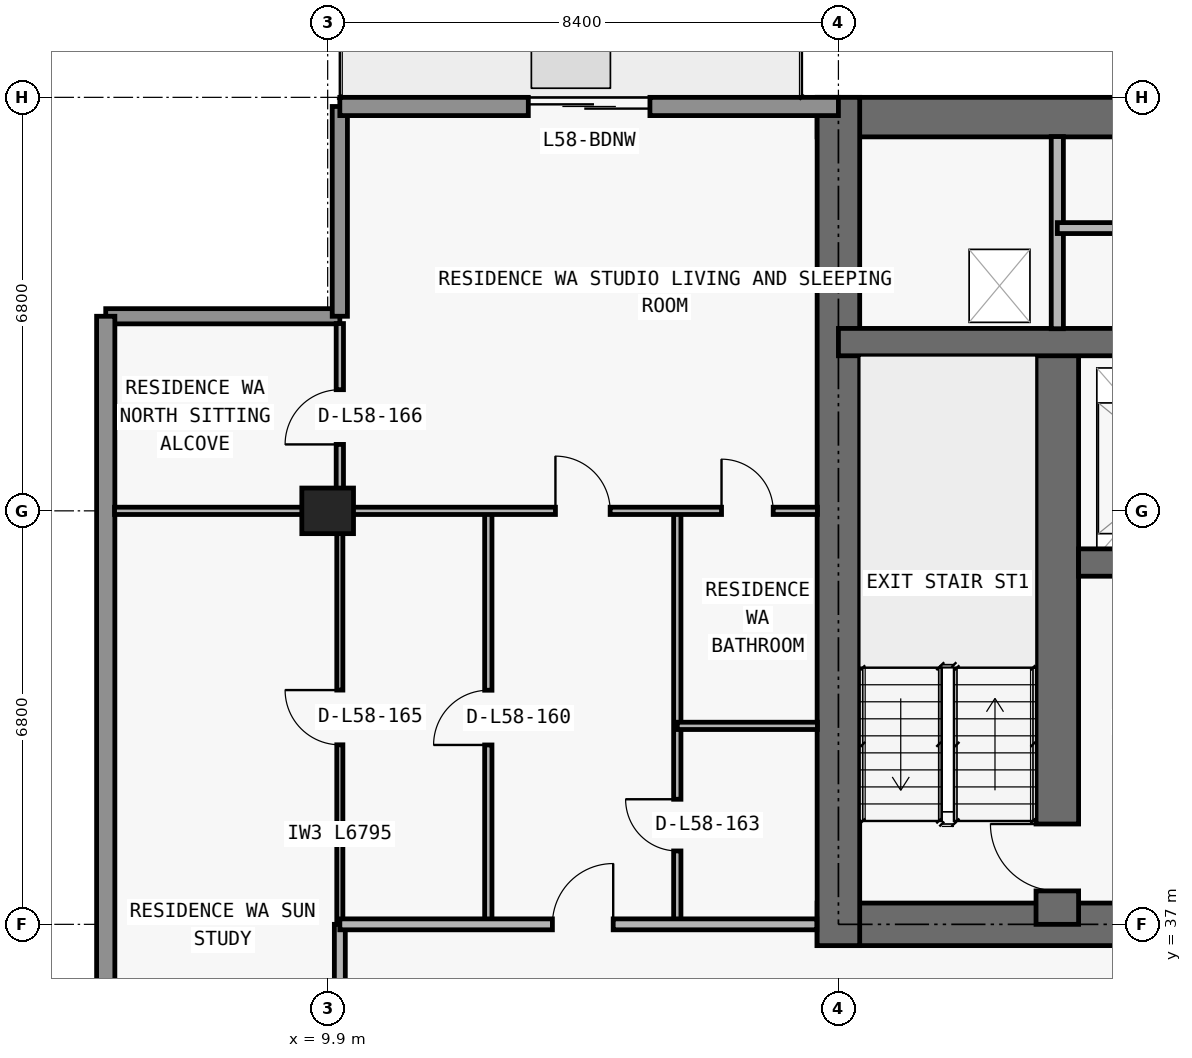
"""IFC4 building model, lengths in metres.
Left out: names, types, materials, properties, quantities, classifications, styles, units other than length and angle.
Written with IfcOpenShell. Run it as: python <this file> out.ifc"""

import sys

from ifc_helpers import new_model, si_unit, direction, frame, frame_2d, origin, origin_2d, place, context, subcontext, project, spatial, rectangle, extrude, element, fill, save


model = new_model("IFC4")
c1 = context("Model", 3, precision=1e-05, world=origin(), true_north=direction((0.0, 1.0)))
c2 = subcontext(c1, "Body", "Model", "MODEL_VIEW")
j1 = project(units=[si_unit("LENGTHUNIT", "METRE"), si_unit("PLANEANGLEUNIT", "RADIAN")], contexts=[c1])
p1 = place(None, origin())
s1 = spatial("IfcSite", under=j1, at=p1, CompositionType="ELEMENT")
p2 = place(p1, origin())
s2 = spatial("IfcBuilding", under=s1, at=p2, CompositionType="ELEMENT")
p3 = place(p2, frame((0.0, 0.0, 208.2)))
s3 = spatial("IfcBuildingStorey", under=s2, at=p3, CompositionType="ELEMENT", Elevation=208.2)
p4 = place(p3, frame((9.9, 43.8, 0.0), z_axis=(0.0, 0.0, 1.0), x_axis=(1.0, 0.0, 0.0)))
e1 = element("IfcColumn", 1, at=p4, inside=s3, PredefinedType="COLUMN", context=c2, shape_type="SweptSolid", body=[
    extrude(rectangle(XDim=0.85, YDim=0.75, at=origin_2d()), origin(), (0.0, 0.0, 1.0), 3.05),
])
p5 = place(p3, frame((17.95, 37.0, 0.0), z_axis=(0.0, 0.0, 1.0), x_axis=(1.0, 0.0, 0.0)))
e2 = element("IfcWall", 2, at=p5, inside=s3, PredefinedType="SHEAR", context=c2, shape_type="SweptSolid", body=[
    extrude(rectangle(XDim=41.9, YDim=0.7, at=frame_2d((20.95, 0.0))), origin(), (0.0, 0.0, 1.0), 3.05),
])
p6 = place(p5, frame((14.35, 0.0, 0.0)))
e3 = element("IfcOpeningElement", 3, at=p6, cuts=e2, PredefinedType="OPENING", context=c2, shape_type="SweptSolid", body=[
    extrude(rectangle(XDim=1.1, YDim=2.15, at=frame_2d((0.55, 1.075))), frame((0.0, 0.36, 0.0), z_axis=(0.0, -1.0, 0.0), x_axis=(1.0, 0.0, 0.0)), (0.0, 0.0, 1.0), 0.72),
])
p7 = place(p5, frame((6.2, 0.0, 0.0)))
e4 = element("IfcOpeningElement", 4, at=p7, cuts=e2, PredefinedType="OPENING", context=c2, shape_type="SweptSolid", body=[
    extrude(rectangle(XDim=1.05, YDim=2.15, at=frame_2d((0.525, 1.075))), frame((0.0, 0.36, 0.0), z_axis=(0.0, -1.0, 0.0), x_axis=(1.0, 0.0, 0.0)), (0.0, 0.0, 1.0), 0.72),
])
p8 = place(p5, frame((34.7, 0.0, 0.0)))
e5 = element("IfcOpeningElement", 5, at=p8, cuts=e2, PredefinedType="OPENING", context=c2, shape_type="SweptSolid", body=[
    extrude(rectangle(XDim=1.05, YDim=2.15, at=frame_2d((0.525, 1.075))), frame((0.0, 0.36, 0.0), z_axis=(0.0, -1.0, 0.0), x_axis=(1.0, 0.0, 0.0)), (0.0, 0.0, 1.0), 0.72),
])
p9 = place(p5, frame((10.812, 0.0, 0.0)))
e6 = element("IfcOpeningElement", 6, at=p9, cuts=e2, PredefinedType="OPENING", context=c2, shape_type="SweptSolid", body=[
    extrude(rectangle(XDim=1.05, YDim=2.15, at=frame_2d((0.525, 1.075))), frame((0.0, 0.36, 0.0), z_axis=(0.0, -1.0, 0.0), x_axis=(1.0, 0.0, 0.0)), (0.0, 0.0, 1.0), 0.72),
])
p10 = place(p5, frame((24.05, 0.0, 0.0)))
e7 = element("IfcOpeningElement", 7, at=p10, cuts=e2, PredefinedType="OPENING", context=c2, shape_type="SweptSolid", body=[
    extrude(rectangle(XDim=1.05, YDim=2.15, at=frame_2d((0.525, 1.075))), frame((0.0, 0.36, 0.0), z_axis=(0.0, -1.0, 0.0), x_axis=(1.0, 0.0, 0.0)), (0.0, 0.0, 1.0), 0.72),
])
p11 = place(p3, frame((17.95, 50.275, 0.0), z_axis=(0.0, 0.0, 1.0), x_axis=(1.0, 0.0, 0.0)))
e8 = element("IfcWall", 8, at=p11, inside=s3, PredefinedType="SHEAR", context=c2, shape_type="SweptSolid", body=[
    extrude(rectangle(XDim=41.9, YDim=0.65, at=frame_2d((20.95, 0.0))), origin(), (0.0, 0.0, 1.0), 3.05),
])
p12 = place(p3, frame((18.3, 36.65, 0.0), z_axis=(0.0, 0.0, 1.0), x_axis=(0.0, 1.0, 0.0)))
e9 = element("IfcWall", 9, at=p12, inside=s3, PredefinedType="SHEAR", context=c2, shape_type="SweptSolid", body=[
    extrude(rectangle(XDim=13.95, YDim=0.7, at=frame_2d((6.975, 0.0))), origin(), (0.0, 0.0, 1.0), 3.05),
])
p13 = place(p3, frame((21.9, 37.0, 0.0), z_axis=(0.0, 0.0, 1.0), x_axis=(0.0, 1.0, 0.0)))
e10 = element("IfcWall", 10, at=p13, inside=s3, PredefinedType="SHEAR", context=c2, shape_type="SweptSolid", body=[
    extrude(rectangle(XDim=9.575, YDim=0.7, at=frame_2d((4.788, 0.0))), origin(), (0.0, 0.0, 1.0), 3.05),
])
p14 = place(p13, frame((0.55, 0.0, 0.0)))
e11 = element("IfcOpeningElement", 11, at=p14, cuts=e10, PredefinedType="OPENING", context=c2, shape_type="SweptSolid", body=[
    extrude(rectangle(XDim=1.1, YDim=2.15, at=frame_2d((0.55, 1.075))), frame((0.0, 0.36, 0.0), z_axis=(0.0, -1.0, 0.0), x_axis=(1.0, 0.0, 0.0)), (0.0, 0.0, 1.0), 0.72),
])
p15 = place(p3, frame((22.25, 42.95, 0.0), z_axis=(0.0, 0.0, 1.0), x_axis=(1.0, 0.0, 0.0)))
e12 = element("IfcWall", 12, at=p15, inside=s3, PredefinedType="SHEAR", context=c2, shape_type="SweptSolid", body=[
    extrude(rectangle(XDim=33.3, YDim=0.45, at=frame_2d((16.65, 0.0))), origin(), (0.0, 0.0, 1.0), 3.05),
])
p16 = place(p15, frame((1.05, 0.0, 0.0)))
e13 = element("IfcOpeningElement", 13, at=p16, cuts=e12, PredefinedType="OPENING", context=c2, shape_type="SweptSolid", body=[
    extrude(rectangle(XDim=1.2, YDim=2.2, at=frame_2d((0.6, 1.1))), frame((0.0, 0.235, 0.0), z_axis=(0.0, -1.0, 0.0), x_axis=(1.0, 0.0, 0.0)), (0.0, 0.0, 1.0), 0.47),
])
p17 = place(p15, frame((31.05, 0.0, 0.0)))
e14 = element("IfcOpeningElement", 14, at=p17, cuts=e12, PredefinedType="OPENING", context=c2, shape_type="SweptSolid", body=[
    extrude(rectangle(XDim=1.2, YDim=2.2, at=frame_2d((0.6, 1.1))), frame((0.0, 0.235, 0.0), z_axis=(0.0, -1.0, 0.0), x_axis=(1.0, 0.0, 0.0)), (0.0, 0.0, 1.0), 0.47),
])
p18 = place(p15, frame((26.45, 0.0, 0.0)))
e15 = element("IfcOpeningElement", 15, at=p18, cuts=e12, PredefinedType="OPENING", context=c2, shape_type="SweptSolid", body=[
    extrude(rectangle(XDim=1.1, YDim=2.2, at=frame_2d((0.55, 1.1))), frame((0.0, 0.235, 0.0), z_axis=(0.0, -1.0, 0.0), x_axis=(1.0, 0.0, 0.0)), (0.0, 0.0, 1.0), 0.47),
])
p19 = place(p15, frame((5.95, 0.0, 0.0)))
e16 = element("IfcOpeningElement", 16, at=p19, cuts=e12, PredefinedType="OPENING", context=c2, shape_type="SweptSolid", body=[
    extrude(rectangle(XDim=1.1, YDim=2.2, at=frame_2d((0.55, 1.1))), frame((0.0, 0.235, 0.0), z_axis=(0.0, -1.0, 0.0), x_axis=(1.0, 0.0, 0.0)), (0.0, 0.0, 1.0), 0.47),
])
p20 = place(p15, frame((3.625, 0.0, 0.0)))
e17 = element("IfcOpeningElement", 17, at=p20, cuts=e12, PredefinedType="OPENING", context=c2, shape_type="SweptSolid", body=[
    extrude(rectangle(XDim=1.05, YDim=2.15, at=frame_2d((0.525, 1.075))), frame((0.0, 0.235, 0.0), z_axis=(0.0, -1.0, 0.0), x_axis=(1.0, 0.0, 0.0)), (0.0, 0.0, 1.0), 0.47),
])
p21 = place(p15, frame((28.675, 0.0, 0.0)))
e18 = element("IfcOpeningElement", 18, at=p21, cuts=e12, PredefinedType="OPENING", context=c2, shape_type="SweptSolid", body=[
    extrude(rectangle(XDim=1.05, YDim=2.15, at=frame_2d((0.525, 1.075))), frame((0.0, 0.235, 0.0), z_axis=(0.0, -1.0, 0.0), x_axis=(1.0, 0.0, 0.0)), (0.0, 0.0, 1.0), 0.47),
])
p22 = place(p15, frame((15.225, 0.0, 0.0)))
e19 = element("IfcOpeningElement", 19, at=p22, cuts=e12, PredefinedType="OPENING", context=c2, shape_type="SweptSolid", body=[
    extrude(rectangle(XDim=1.0, YDim=2.2, at=frame_2d((0.5, 1.1))), frame((0.0, 0.235, 0.0), z_axis=(0.0, -1.0, 0.0), x_axis=(1.0, 0.0, 0.0)), (0.0, 0.0, 1.0), 0.47),
])
p23 = place(p15, frame((21.975, 0.0, 0.0)))
e20 = element("IfcOpeningElement", 20, at=p23, cuts=e12, PredefinedType="OPENING", context=c2, shape_type="SweptSolid", body=[
    extrude(rectangle(XDim=1.0, YDim=2.2, at=frame_2d((0.5, 1.1))), frame((0.0, 0.235, 0.0), z_axis=(0.0, -1.0, 0.0), x_axis=(1.0, 0.0, 0.0)), (0.0, 0.0, 1.0), 0.47),
])
p24 = place(p3, frame((18.3, 46.575, 0.0), z_axis=(0.0, 0.0, 1.0), x_axis=(1.0, 0.0, 0.0)))
e21 = element("IfcWall", 21, at=p24, inside=s3, PredefinedType="SHEAR", context=c2, shape_type="SweptSolid", body=[
    extrude(rectangle(XDim=41.2, YDim=0.45, at=frame_2d((20.6, 0.0))), origin(), (0.0, 0.0, 1.0), 3.05),
])
p25 = place(p24, frame((7.575, 0.0, 0.0)))
e22 = element("IfcOpeningElement", 22, at=p25, cuts=e21, PredefinedType="OPENING", context=c2, shape_type="SweptSolid", body=[
    extrude(rectangle(XDim=1.05, YDim=2.15, at=frame_2d((0.525, 1.075))), frame((0.0, 0.235, 0.0), z_axis=(0.0, -1.0, 0.0), x_axis=(1.0, 0.0, 0.0)), (0.0, 0.0, 1.0), 0.47),
])
p26 = place(p24, frame((32.625, 0.0, 0.0)))
e23 = element("IfcOpeningElement", 23, at=p26, cuts=e21, PredefinedType="OPENING", context=c2, shape_type="SweptSolid", body=[
    extrude(rectangle(XDim=1.05, YDim=2.15, at=frame_2d((0.525, 1.075))), frame((0.0, 0.235, 0.0), z_axis=(0.0, -1.0, 0.0), x_axis=(1.0, 0.0, 0.0)), (0.0, 0.0, 1.0), 0.47),
])
p27 = place(p3, frame((6.25, 47.0, 0.0), z_axis=(0.0, 0.0, 1.0), x_axis=(1.0, 0.0, 0.0)))
e24 = element("IfcWall", 24, at=p27, inside=s3, PredefinedType="ELEMENTEDWALL", context=c2, shape_type="SweptSolid", body=[
    extrude(rectangle(XDim=3.85, YDim=0.25, at=frame_2d((1.925, 0.0))), origin(), (0.0, 0.0, 1.0), 3.05),
])
p28 = place(p3, frame((10.1, 47.0, 0.0), z_axis=(0.0, 0.0, 1.0), x_axis=(0.0, 1.0, 0.0)))
e25 = element("IfcWall", 25, at=p28, inside=s3, PredefinedType="ELEMENTEDWALL", context=c2, shape_type="SweptSolid", body=[
    extrude(rectangle(XDim=3.45, YDim=0.25, at=frame_2d((1.725, 0.0))), origin(), (0.0, 0.0, 1.0), 3.05),
])
p29 = place(p3, frame((6.25, 29.1, 0.0), z_axis=(0.0, 0.0, 1.0), x_axis=(0.0, 1.0, 0.0)))
e26 = element("IfcWall", 26, at=p29, inside=s3, PredefinedType="STANDARD", context=c2, shape_type="SweptSolid", body=[
    extrude(rectangle(XDim=17.9, YDim=0.3, at=frame_2d((8.95, 0.0))), origin(), (0.0, 0.0, 1.0), 3.05),
])
p30 = place(p3, frame((10.1, 50.45, 0.0), z_axis=(0.0, 0.0, 1.0), x_axis=(1.0, 0.0, 0.0)))
e27 = element("IfcWall", 27, at=p30, inside=s3, PredefinedType="STANDARD", context=c2, shape_type="SweptSolid", body=[
    extrude(rectangle(XDim=8.2, YDim=0.3, at=frame_2d((4.1, 0.0))), origin(), (0.0, 0.0, 1.0), 3.05),
])
p31 = place(p30, frame((3.1, 0.0, 0.0)))
e28 = element("IfcOpeningElement", 28, at=p31, cuts=e27, PredefinedType="OPENING", context=c2, shape_type="SweptSolid", body=[
    extrude(rectangle(XDim=2.0, YDim=2.3, at=frame_2d((1.0, 1.15))), frame((0.0, 0.16, 0.0), z_axis=(0.0, -1.0, 0.0), x_axis=(1.0, 0.0, 0.0)), (0.0, 0.0, 1.0), 0.32),
])
p32 = place(p3, frame((10.1, 34.005, 0.0), z_axis=(0.0, 0.0, 1.0), x_axis=(0.0, 1.0, 0.0)))
e29 = element("IfcWall", 29, at=p32, inside=s3, PredefinedType="PARTITIONING", context=c2, shape_type="SweptSolid", body=[
    extrude(rectangle(XDim=2.995, YDim=0.18, at=frame_2d((1.498, 0.0))), origin(), (0.0, 0.0, 1.0), 2.263),
])
p33 = place(p3, frame((10.1, 37.005, 0.0), z_axis=(0.0, 0.0, 1.0), x_axis=(0.0, 1.0, 0.0)))
e30 = element("IfcWall", 30, at=p33, inside=s3, PredefinedType="MOVABLE", context=c2, shape_type="SweptSolid", body=[
    extrude(rectangle(XDim=6.795, YDim=0.1, at=frame_2d((3.397, 0.0))), origin(), (0.0, 0.0, 1.0), 2.263),
])
p34 = place(p33, frame((2.948, 0.0, 0.0)))
e31 = element("IfcOpeningElement", 31, at=p34, cuts=e30, PredefinedType="OPENING", context=c2, shape_type="SweptSolid", body=[
    extrude(rectangle(XDim=0.9, YDim=2.15, at=frame_2d((0.45, 1.075))), frame((0.0, 0.06, 0.0), z_axis=(0.0, -1.0, 0.0), x_axis=(1.0, 0.0, 0.0)), (0.0, 0.0, 1.0), 0.12),
])
p35 = place(p3, frame((10.1, 43.805, 0.0), z_axis=(0.0, 0.0, 1.0), x_axis=(0.0, 1.0, 0.0)))
e32 = element("IfcWall", 32, at=p35, inside=s3, PredefinedType="PARTITIONING", context=c2, shape_type="SweptSolid", body=[
    extrude(rectangle(XDim=3.075, YDim=0.12, at=frame_2d((1.538, 0.0))), origin(), (0.0, 0.0, 1.0), 3.05),
])
p36 = place(p35, frame((1.087, 0.0, 0.0)))
e33 = element("IfcOpeningElement", 33, at=p36, cuts=e32, PredefinedType="OPENING", context=c2, shape_type="SweptSolid", body=[
    extrude(rectangle(XDim=0.9, YDim=2.15, at=frame_2d((0.45, 1.075))), frame((0.0, 0.07, 0.0), z_axis=(0.0, -1.0, 0.0), x_axis=(1.0, 0.0, 0.0)), (0.0, 0.0, 1.0), 0.14),
])
p37 = place(p3, frame((12.542, 37.0, 0.0), z_axis=(0.0, 0.0, 1.0), x_axis=(0.0, 1.0, 0.0)))
e34 = element("IfcWall", 34, at=p37, inside=s3, PredefinedType="PARTITIONING", context=c2, shape_type="SweptSolid", body=[
    extrude(rectangle(XDim=6.8, YDim=0.12, at=frame_2d((3.4, 0.0))), origin(), (0.0, 0.0, 1.0), 3.05),
])
p38 = place(p37, frame((2.95, 0.0, 0.0)))
e35 = element("IfcOpeningElement", 35, at=p38, cuts=e34, PredefinedType="OPENING", context=c2, shape_type="SweptSolid", body=[
    extrude(rectangle(XDim=0.9, YDim=2.15, at=frame_2d((0.45, 1.075))), frame((0.0, 0.07, 0.0), z_axis=(0.0, -1.0, 0.0), x_axis=(1.0, 0.0, 0.0)), (0.0, 0.0, 1.0), 0.14),
])
p39 = place(p3, frame((15.65, 37.0, 0.0), z_axis=(0.0, 0.0, 1.0), x_axis=(0.0, 1.0, 0.0)))
e36 = element("IfcWall", 36, at=p39, inside=s3, PredefinedType="PARTITIONING", context=c2, shape_type="SweptSolid", body=[
    extrude(rectangle(XDim=6.8, YDim=0.12, at=frame_2d((3.4, 0.0))), origin(), (0.0, 0.0, 1.0), 3.05),
])
p40 = place(p39, frame((1.207, 0.0, 0.0)))
e37 = element("IfcOpeningElement", 37, at=p40, cuts=e36, PredefinedType="OPENING", context=c2, shape_type="SweptSolid", body=[
    extrude(rectangle(XDim=0.85, YDim=2.1, at=frame_2d((0.425, 1.05))), frame((0.0, 0.07, 0.0), z_axis=(0.0, -1.0, 0.0), x_axis=(1.0, 0.0, 0.0)), (0.0, 0.0, 1.0), 0.14),
])
p41 = place(p3, frame((21.9, 46.795, 0.0), z_axis=(0.0, 0.0, 1.0), x_axis=(0.0, 1.0, 0.0)))
e38 = element("IfcWall", 38, at=p41, inside=s3, PredefinedType="PARTITIONING", context=c2, shape_type="SweptSolid", body=[
    extrude(rectangle(XDim=3.16, YDim=0.2, at=frame_2d((1.58, 0.0))), origin(), (0.0, 0.0, 1.0), 3.05),
])
p42 = place(p3, frame((10.1, 37.0, 0.0), z_axis=(0.0, 0.0, 1.0), x_axis=(1.0, 0.0, 0.0)))
e39 = element("IfcWall", 39, at=p42, inside=s3, PredefinedType="PARTITIONING", context=c2, shape_type="SweptSolid", body=[
    extrude(rectangle(XDim=7.845, YDim=0.18, at=frame_2d((3.922, 0.0))), origin(), (0.0, 0.0, 1.0), 3.05),
])
p43 = place(p42, frame((3.496, 0.0, 0.0)))
e40 = element("IfcOpeningElement", 40, at=p43, cuts=e39, PredefinedType="OPENING", context=c2, shape_type="SweptSolid", body=[
    extrude(rectangle(XDim=1.0, YDim=2.2, at=frame_2d((0.5, 1.1))), frame((0.0, 0.1, 0.0), z_axis=(0.0, -1.0, 0.0), x_axis=(1.0, 0.0, 0.0)), (0.0, 0.0, 1.0), 0.2),
])
p44 = place(p3, frame((15.65, 40.264, 0.0), z_axis=(0.0, 0.0, 1.0), x_axis=(1.0, 0.0, 0.0)))
e41 = element("IfcWall", 41, at=p44, inside=s3, PredefinedType="PARTITIONING", context=c2, shape_type="SweptSolid", body=[
    extrude(rectangle(XDim=2.305, YDim=0.12, at=frame_2d((1.153, 0.0))), origin(), (0.0, 0.0, 1.0), 3.05),
])
p45 = place(p3, frame((6.395, 43.8, 0.0), z_axis=(0.0, 0.0, 1.0), x_axis=(1.0, 0.0, 0.0)))
e42 = element("IfcWall", 42, at=p45, inside=s3, PredefinedType="PARTITIONING", context=c2, shape_type="SweptSolid", body=[
    extrude(rectangle(XDim=11.56, YDim=0.12, at=frame_2d((5.78, 0.0))), origin(), (0.0, 0.0, 1.0), 2.418),
])
p46 = place(p45, frame((7.251, 0.0, 0.0)))
e43 = element("IfcOpeningElement", 43, at=p46, cuts=e42, PredefinedType="OPENING", context=c2, shape_type="SweptSolid", body=[
    extrude(rectangle(XDim=0.9, YDim=2.15, at=frame_2d((0.45, 1.075))), frame((0.0, 0.07, 0.0), z_axis=(0.0, -1.0, 0.0), x_axis=(1.0, 0.0, 0.0)), (0.0, 0.0, 1.0), 0.14),
])
p47 = place(p45, frame((9.982, 0.0, 0.0)))
e44 = element("IfcOpeningElement", 44, at=p47, cuts=e42, PredefinedType="OPENING", context=c2, shape_type="SweptSolid", body=[
    extrude(rectangle(XDim=0.85, YDim=2.1, at=frame_2d((0.425, 1.05))), frame((0.0, 0.07, 0.0), z_axis=(0.0, -1.0, 0.0), x_axis=(1.0, 0.0, 0.0)), (0.0, 0.0, 1.0), 0.14),
])
p48 = place(p3, frame((21.9, 48.45, 0.0), z_axis=(0.0, 0.0, 1.0), x_axis=(1.0, 0.0, 0.0)))
e45 = element("IfcWall", 45, at=p48, inside=s3, PredefinedType="PARTITIONING", context=c2, shape_type="SweptSolid", body=[
    extrude(rectangle(XDim=4.75, YDim=0.18, at=frame_2d((2.375, 0.0))), origin(), (0.0, 0.0, 1.0), 3.05),
])
p49 = place(p48, frame((1.775, 0.0, 0.0)))
e46 = element("IfcOpeningElement", 46, at=p49, cuts=e45, PredefinedType="OPENING", context=c2, shape_type="SweptSolid", body=[
    extrude(rectangle(XDim=1.2, YDim=2.2, at=frame_2d((0.6, 1.1))), frame((0.0, 0.1, 0.0), z_axis=(0.0, -1.0, 0.0), x_axis=(1.0, 0.0, 0.0)), (0.0, 0.0, 1.0), 0.2),
])
p50 = place(p31, origin())
e47 = element("IfcDoor", 47, at=p50, inside=s3, OperationType="DOUBLE_DOOR_SLIDING", PredefinedType="DOOR", context=c2, shape_type="SweptSolid", body=[
    extrude(rectangle(XDim=2.0, YDim=2.3, at=frame_2d((1.0, 1.15))), frame((0.0, 0.025, 0.0), z_axis=(0.0, -1.0, 0.0), x_axis=(1.0, 0.0, 0.0)), (0.0, 0.0, 1.0), 0.05),
])
fill(e28, e47)
p51 = place(p14, origin())
e48 = element("IfcDoor", 48, at=p51, inside=s3, OperationType="SINGLE_SWING_RIGHT", PredefinedType="DOOR", context=c2, shape_type="SweptSolid", body=[
    extrude(rectangle(XDim=1.1, YDim=2.15, at=frame_2d((0.55, 1.075))), frame((0.0, 0.025, 0.0), z_axis=(0.0, -1.0, 0.0), x_axis=(1.0, 0.0, 0.0)), (0.0, 0.0, 1.0), 0.05),
])
fill(e11, e48)
p52 = place(p38, origin())
e49 = element("IfcDoor", 49, at=p52, inside=s3, OperationType="SINGLE_SWING_LEFT", PredefinedType="DOOR", context=c2, shape_type="SweptSolid", body=[
    extrude(rectangle(XDim=0.9, YDim=2.15, at=frame_2d((0.45, 1.075))), frame((0.0, 0.025, 0.0), z_axis=(0.0, -1.0, 0.0), x_axis=(1.0, 0.0, 0.0)), (0.0, 0.0, 1.0), 0.05),
])
fill(e35, e49)
p53 = place(p43, origin())
e50 = element("IfcDoor", 50, at=p53, inside=s3, OperationType="SINGLE_SWING_RIGHT", PredefinedType="DOOR", context=c2, shape_type="SweptSolid", body=[
    extrude(rectangle(XDim=1.0, YDim=2.2, at=frame_2d((0.5, 1.1))), frame((0.0, 0.025, 0.0), z_axis=(0.0, -1.0, 0.0), x_axis=(1.0, 0.0, 0.0)), (0.0, 0.0, 1.0), 0.05),
])
fill(e40, e50)
p54 = place(p46, origin())
e51 = element("IfcDoor", 51, at=p54, inside=s3, OperationType="SINGLE_SWING_LEFT", PredefinedType="DOOR", context=c2, shape_type="SweptSolid", body=[
    extrude(rectangle(XDim=0.9, YDim=2.15, at=frame_2d((0.45, 1.075))), frame((0.0, 0.025, 0.0), z_axis=(0.0, -1.0, 0.0), x_axis=(1.0, 0.0, 0.0)), (0.0, 0.0, 1.0), 0.05),
])
fill(e43, e51)
p55 = place(p40, origin())
e52 = element("IfcDoor", 52, at=p55, inside=s3, OperationType="SINGLE_SWING_RIGHT", PredefinedType="DOOR", context=c2, shape_type="SweptSolid", body=[
    extrude(rectangle(XDim=0.85, YDim=2.1, at=frame_2d((0.425, 1.05))), frame((0.0, 0.025, 0.0), z_axis=(0.0, -1.0, 0.0), x_axis=(1.0, 0.0, 0.0)), (0.0, 0.0, 1.0), 0.05),
])
fill(e37, e52)
p56 = place(p47, origin())
e53 = element("IfcDoor", 53, at=p56, inside=s3, OperationType="SINGLE_SWING_LEFT", PredefinedType="DOOR", context=c2, shape_type="SweptSolid", body=[
    extrude(rectangle(XDim=0.85, YDim=2.1, at=frame_2d((0.425, 1.05))), frame((0.0, 0.025, 0.0), z_axis=(0.0, -1.0, 0.0), x_axis=(1.0, 0.0, 0.0)), (0.0, 0.0, 1.0), 0.05),
])
fill(e44, e53)
p57 = place(p34, origin())
e54 = element("IfcDoor", 54, at=p57, inside=s3, OperationType="SINGLE_SWING_RIGHT", PredefinedType="DOOR", context=c2, shape_type="SweptSolid", body=[
    extrude(rectangle(XDim=0.9, YDim=2.15, at=frame_2d((0.45, 1.075))), frame((0.0, 0.025, 0.0), z_axis=(0.0, -1.0, 0.0), x_axis=(1.0, 0.0, 0.0)), (0.0, 0.0, 1.0), 0.05),
])
fill(e31, e54)
p58 = place(p36, origin())
e55 = element("IfcDoor", 55, at=p58, inside=s3, OperationType="SINGLE_SWING_LEFT", PredefinedType="DOOR", context=c2, shape_type="SweptSolid", body=[
    extrude(rectangle(XDim=0.9, YDim=2.15, at=frame_2d((0.45, 1.075))), frame((0.0, 0.025, 0.0), z_axis=(0.0, -1.0, 0.0), x_axis=(1.0, 0.0, 0.0)), (0.0, 0.0, 1.0), 0.05),
])
fill(e33, e55)
save(model, sys.argv[1])
